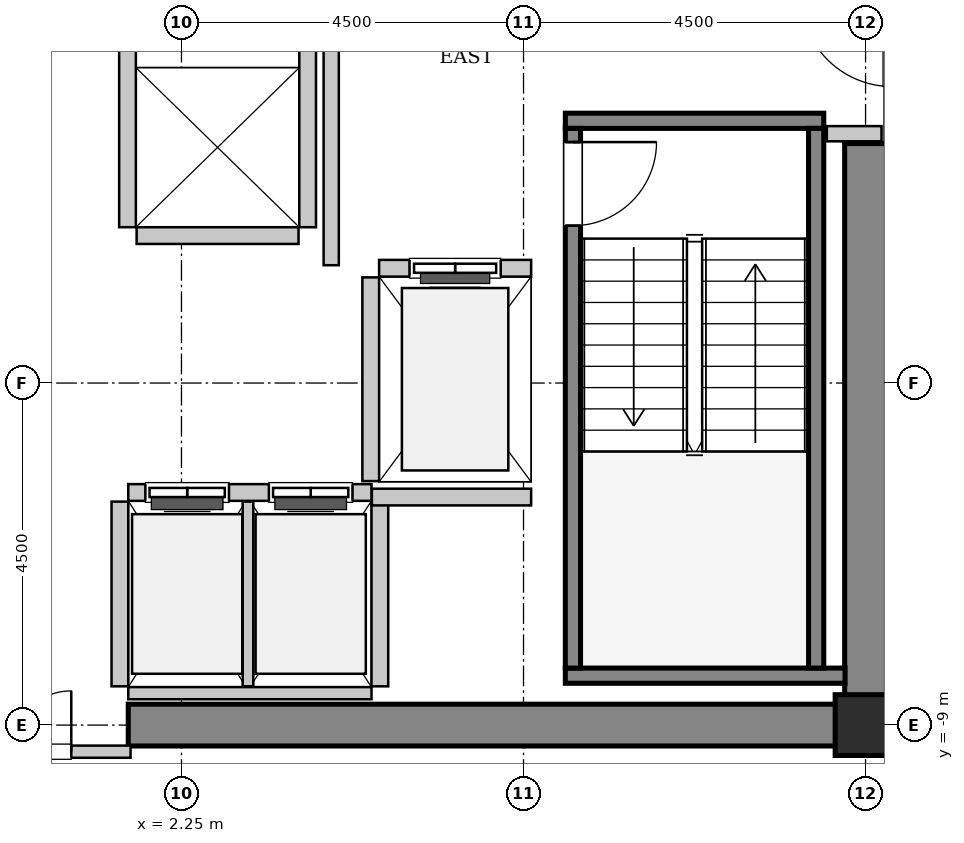
"""IFC4 building model, lengths in metres.
Left out: names, types, materials, properties, quantities, classifications, styles, units other than length and angle.
Written with IfcOpenShell. Run it as: python <this file> out.ifc"""

import sys

from ifc_helpers import new_model, si_unit, direction, frame, frame_2d, origin, origin_2d, place, context, subcontext, project, spatial, rectangle, hollow_rectangle, extrude, source, transform, mapped, element, fill, save


model = new_model("IFC4")
c1 = context("Model", 3, precision=1e-05, world=origin(), true_north=direction((0.0, 1.0)))
c2 = subcontext(c1, "Body", "Model", "MODEL_VIEW")
j1 = project(units=[si_unit("LENGTHUNIT", "METRE"), si_unit("PLANEANGLEUNIT", "RADIAN")], contexts=[c1])
p1 = place(None, origin())
s1 = spatial("IfcSite", under=j1, at=p1, CompositionType="ELEMENT")
p2 = place(p1, origin())
s2 = spatial("IfcBuilding", under=s1, at=p2, CompositionType="ELEMENT")
p3 = place(p2, frame((0.0, 0.0, 194.4)))
s3 = spatial("IfcBuildingStorey", under=s2, at=p3, CompositionType="ELEMENT", Elevation=194.4)
m1 = source(origin(), c2, "Body", "SweptSolid", [
    extrude(rectangle(XDim=9.975, YDim=0.55, at=frame_2d((4.987, 0.0))), origin(), (0.0, 0.0, 1.0), 3.8),
])
p4 = place(p3, frame((1.55, -9.0, 0.0), z_axis=(0.0, 0.0, 1.0), x_axis=(1.0, 0.0, 0.0)))
e1 = element("IfcWall", 1, at=p4, inside=s3, PredefinedType="SHEAR", context=c2, shape_type="MappedRepresentation", body=[
    mapped(m1, transform((0.0, 0.0, 0.0), x_axis=(1.0, 0.0, 0.0), y_axis=(0.0, 1.0, 0.0), z_axis=(0.0, 0.0, 1.0), scale=1.0)),
])
m2 = source(origin(), c2, "Body", "SweptSolid", [
    extrude(rectangle(XDim=7.375, YDim=0.55, at=frame_2d((3.688, 0.0))), origin(), (0.0, 0.0, 1.0), 3.8),
])
p5 = place(p3, frame((11.25, -8.725, 0.0), z_axis=(0.0, 0.0, 1.0), x_axis=(0.0, 1.0, 0.0)))
e2 = element("IfcWall", 2, at=p5, inside=s3, PredefinedType="SHEAR", context=c2, shape_type="MappedRepresentation", body=[
    mapped(m2, transform((0.0, 0.0, 0.0), x_axis=(1.0, 0.0, 0.0), y_axis=(0.0, 1.0, 0.0), z_axis=(0.0, 0.0, 1.0), scale=1.0)),
])
m3 = source(origin(), c2, "Body", "SweptSolid", [
    extrude(hollow_rectangle(XDim=0.8, YDim=0.8, WallThickness=0.04, InnerFilletRadius=0.04, OuterFilletRadius=0.08, at=origin_2d()), origin(), (0.0, 0.0, 1.0), 3.8),
])
p6 = place(p3, frame((11.25, -9.0, 0.0), z_axis=(0.0, 0.0, 1.0), x_axis=(1.0, 0.0, 0.0)))
e3 = element("IfcColumn", 3, at=p6, inside=s3, PredefinedType="COLUMN", context=c2, shape_type="MappedRepresentation", body=[
    mapped(m3, transform((0.0, 0.0, 0.0), x_axis=(1.0, 0.0, 0.0), y_axis=(0.0, 1.0, 0.0), z_axis=(0.0, 0.0, 1.0), scale=1.0)),
])
m4 = source(origin(), c2, "Body", "SweptSolid", [
    extrude(rectangle(XDim=3.4, YDim=0.2, at=frame_2d((1.7, 0.0))), origin(), (0.0, 0.0, 1.0), 3.8),
])
p7 = place(p3, frame((7.3, -1.05, 0.0), z_axis=(0.0, 0.0, 1.0), x_axis=(1.0, 0.0, 0.0)))
e4 = element("IfcWall", 4, at=p7, inside=s3, PredefinedType="SOLIDWALL", context=c2, shape_type="MappedRepresentation", body=[
    mapped(m4, transform((0.0, 0.0, 0.0), x_axis=(1.0, 0.0, 0.0), y_axis=(0.0, 1.0, 0.0), z_axis=(0.0, 0.0, 1.0), scale=1.0)),
])
m5 = source(origin(), c2, "Body", "SweptSolid", [
    extrude(rectangle(XDim=3.68, YDim=0.2, at=frame_2d((1.84, 0.0))), origin(), (0.0, 0.0, 1.0), 3.8),
])
p8 = place(p3, frame((7.3, -8.35, 0.0), z_axis=(0.0, 0.0, 1.0), x_axis=(1.0, 0.0, 0.0)))
e5 = element("IfcWall", 5, at=p8, inside=s3, PredefinedType="SOLIDWALL", context=c2, shape_type="MappedRepresentation", body=[
    mapped(m5, transform((0.0, 0.0, 0.0), x_axis=(1.0, 0.0, 0.0), y_axis=(0.0, 1.0, 0.0), z_axis=(0.0, 0.0, 1.0), scale=1.0)),
])
m6 = source(origin(), c2, "Body", "SweptSolid", [
    extrude(rectangle(XDim=7.1, YDim=0.2, at=frame_2d((3.55, 0.0))), origin(), (0.0, 0.0, 1.0), 3.8),
])
p9 = place(p3, frame((7.4, -1.15, 0.0), z_axis=(0.0, 0.0, 1.0), x_axis=(0.0, -1.0, 0.0)))
e6 = element("IfcWall", 6, at=p9, inside=s3, PredefinedType="SOLIDWALL", context=c2, shape_type="MappedRepresentation", body=[
    mapped(m6, transform((0.0, 0.0, 0.0), x_axis=(1.0, 0.0, 0.0), y_axis=(0.0, 1.0, 0.0), z_axis=(0.0, 0.0, 1.0), scale=1.0)),
])
p10 = place(p9, frame((0.18, 0.0, 0.0)))
e7 = element("IfcOpeningElement", 7, at=p10, cuts=e6, PredefinedType="OPENING", context=c2, shape_type="SweptSolid", body=[
    extrude(rectangle(XDim=1.1, YDim=2.15, at=frame_2d((0.55, 1.075))), frame((0.0, 0.11, 0.0), z_axis=(0.0, -1.0, 0.0), x_axis=(1.0, 0.0, 0.0)), (0.0, 0.0, 1.0), 0.22),
])
p11 = place(p3, frame((10.6, -1.15, 0.0), z_axis=(0.0, 0.0, 1.0), x_axis=(0.0, -1.0, 0.0)))
e8 = element("IfcWall", 8, at=p11, inside=s3, PredefinedType="SOLIDWALL", context=c2, shape_type="MappedRepresentation", body=[
    mapped(m6, transform((0.0, 0.0, 0.0), x_axis=(1.0, 0.0, 0.0), y_axis=(0.0, 1.0, 0.0), z_axis=(0.0, 0.0, 1.0), scale=1.0)),
])
m7 = source(origin(), c2, "Body", "SweptSolid", [
    extrude(rectangle(XDim=2.0, YDim=0.22, at=frame_2d((1.0, 0.0))), origin(), (0.0, 0.0, 1.0), 3.535),
])
p12 = place(p3, frame((6.85, -2.99, 0.0), z_axis=(0.0, 0.0, 1.0), x_axis=(-1.0, 0.0, 0.0)))
e9 = element("IfcWall", 9, at=p12, inside=s3, PredefinedType="SOLIDWALL", context=c2, shape_type="MappedRepresentation", body=[
    mapped(m7, transform((0.0, 0.0, 0.0), x_axis=(1.0, 0.0, 0.0), y_axis=(0.0, 1.0, 0.0), z_axis=(0.0, 0.0, 1.0), scale=1.0)),
])
p13 = place(p12, frame((0.4, 0.0, 0.0)))
e10 = element("IfcOpeningElement", 10, at=p13, cuts=e9, PredefinedType="OPENING", context=c2, shape_type="SweptSolid", body=[
    extrude(rectangle(XDim=1.2, YDim=2.2, at=frame_2d((0.6, 1.1))), frame((0.0, 0.12, 0.0), z_axis=(0.0, -1.0, 0.0), x_axis=(1.0, 0.0, 0.0)), (0.0, 0.0, 1.0), 0.24),
])
m8 = source(origin(), c2, "Body", "SweptSolid", [
    extrude(rectangle(XDim=2.68, YDim=0.22, at=frame_2d((1.34, 0.0))), origin(), (0.0, 0.0, 1.0), 3.535),
])
p14 = place(p3, frame((4.74, -3.11, 0.0), z_axis=(0.0, 0.0, 1.0), x_axis=(0.0, -1.0, 0.0)))
e11 = element("IfcWall", 11, at=p14, inside=s3, PredefinedType="SOLIDWALL", context=c2, shape_type="MappedRepresentation", body=[
    mapped(m8, transform((0.0, 0.0, 0.0), x_axis=(1.0, 0.0, 0.0), y_axis=(0.0, 1.0, 0.0), z_axis=(0.0, 0.0, 1.0), scale=1.0)),
])
m9 = source(origin(), c2, "Body", "SweptSolid", [
    extrude(rectangle(XDim=3.2, YDim=0.22, at=frame_2d((1.6, 0.0))), origin(), (0.0, 0.0, 1.0), 3.535),
])
p15 = place(p3, frame((4.75, -5.94, 0.0), z_axis=(0.0, 0.0, 1.0), x_axis=(-1.0, 0.0, 0.0)))
e12 = element("IfcWall", 12, at=p15, inside=s3, PredefinedType="SOLIDWALL", context=c2, shape_type="MappedRepresentation", body=[
    mapped(m9, transform((0.0, 0.0, 0.0), x_axis=(1.0, 0.0, 0.0), y_axis=(0.0, 1.0, 0.0), z_axis=(0.0, 0.0, 1.0), scale=1.0)),
])
p16 = place(p15, frame((1.875, 0.0, 0.0)))
e13 = element("IfcOpeningElement", 13, at=p16, cuts=e12, PredefinedType="OPENING", context=c2, shape_type="SweptSolid", body=[
    extrude(rectangle(XDim=1.1, YDim=2.2, at=frame_2d((0.55, 1.1))), frame((0.0, 0.12, 0.0), z_axis=(0.0, -1.0, 0.0), x_axis=(1.0, 0.0, 0.0)), (0.0, 0.0, 1.0), 0.24),
])
p17 = place(p15, frame((0.25, 0.0, 0.0)))
e14 = element("IfcOpeningElement", 14, at=p17, cuts=e12, PredefinedType="OPENING", context=c2, shape_type="SweptSolid", body=[
    extrude(rectangle(XDim=1.1, YDim=2.2, at=frame_2d((0.55, 1.1))), frame((0.0, 0.12, 0.0), z_axis=(0.0, -1.0, 0.0), x_axis=(1.0, 0.0, 0.0)), (0.0, 0.0, 1.0), 0.24),
])
m10 = source(origin(), c2, "Body", "SweptSolid", [
    extrude(rectangle(XDim=3.2, YDim=0.16, at=frame_2d((1.6, 0.0))), origin(), (0.0, 0.0, 1.0), 2.425),
])
p18 = place(p3, frame((1.55, -8.58, 0.0), z_axis=(0.0, 0.0, 1.0), x_axis=(1.0, 0.0, 0.0)))
e15 = element("IfcWall", 15, at=p18, inside=s3, PredefinedType="PARTITIONING", context=c2, shape_type="MappedRepresentation", body=[
    mapped(m10, transform((0.0, 0.0, 0.0), x_axis=(1.0, 0.0, 0.0), y_axis=(0.0, 1.0, 0.0), z_axis=(0.0, 0.0, 1.0), scale=1.0)),
])
m11 = source(origin(), c2, "Body", "SweptSolid", [
    extrude(rectangle(XDim=2.43, YDim=0.22, at=frame_2d((1.215, 0.0))), origin(), (0.0, 0.0, 1.0), 3.535),
])
p19 = place(p3, frame((1.44, -6.06, 0.0), z_axis=(0.0, 0.0, 1.0), x_axis=(0.0, -1.0, 0.0)))
e16 = element("IfcWall", 16, at=p19, inside=s3, PredefinedType="SOLIDWALL", context=c2, shape_type="MappedRepresentation", body=[
    mapped(m11, transform((0.0, 0.0, 0.0), x_axis=(1.0, 0.0, 0.0), y_axis=(0.0, 1.0, 0.0), z_axis=(0.0, 0.0, 1.0), scale=1.0)),
])
m12 = source(origin(), c2, "Body", "SweptSolid", [
    extrude(rectangle(XDim=2.43, YDim=0.14, at=frame_2d((1.215, 0.0))), origin(), (0.0, 0.0, 1.0), 3.535),
])
p20 = place(p3, frame((3.125, -8.49, 0.0), z_axis=(0.0, 0.0, 1.0), x_axis=(0.0, 1.0, 0.0)))
e17 = element("IfcWall", 17, at=p20, inside=s3, PredefinedType="PARTITIONING", context=c2, shape_type="MappedRepresentation", body=[
    mapped(m12, transform((0.0, 0.0, 0.0), x_axis=(1.0, 0.0, 0.0), y_axis=(0.0, 1.0, 0.0), z_axis=(0.0, 0.0, 1.0), scale=1.0)),
])
p21 = place(p3, frame((4.86, -8.49, 0.0), z_axis=(0.0, 0.0, 1.0), x_axis=(0.0, 1.0, 0.0)))
e18 = element("IfcWall", 18, at=p21, inside=s3, PredefinedType="SOLIDWALL", context=c2, shape_type="MappedRepresentation", body=[
    mapped(m11, transform((0.0, 0.0, 0.0), x_axis=(1.0, 0.0, 0.0), y_axis=(0.0, 1.0, 0.0), z_axis=(0.0, 0.0, 1.0), scale=1.0)),
])
m13 = source(origin(), c2, "Body", "SweptSolid", [
    extrude(rectangle(XDim=4.9, YDim=0.22, at=frame_2d((2.45, 0.0))), origin(), (0.0, 0.0, 1.0), 3.535),
])
for number, where, z_axis, x_axis in (
    (19, (1.54, 2.45, 0.0), (0.0, 0.0, 1.0), (0.0, -1.0, 0.0)),
    (20, (3.91, -2.45, 0.0), (0.0, 0.0, 1.0), (0.0, 1.0, 0.0)),
):
    element("IfcWall", number, at=place(p3, frame(where, z_axis=z_axis, x_axis=x_axis)), inside=s3, PredefinedType="SOLIDWALL", context=c2, shape_type="MappedRepresentation", body=[
        mapped(m13, transform((0.0, 0.0, 0.0), x_axis=(1.0, 0.0, 0.0), y_axis=(0.0, 1.0, 0.0), z_axis=(0.0, 0.0, 1.0), scale=1.0)),
    ])
m14 = source(origin(), c2, "Body", "SweptSolid", [
    extrude(rectangle(XDim=2.13, YDim=0.22, at=frame_2d((1.065, 0.0))), origin(), (0.0, 0.0, 1.0), 3.535),
])
p22 = place(p3, frame((1.66, -2.56, 0.0), z_axis=(0.0, 0.0, 1.0), x_axis=(1.0, 0.0, 0.0)))
e21 = element("IfcWall", 21, at=p22, inside=s3, PredefinedType="SOLIDWALL", context=c2, shape_type="MappedRepresentation", body=[
    mapped(m14, transform((0.0, 0.0, 0.0), x_axis=(1.0, 0.0, 0.0), y_axis=(0.0, 1.0, 0.0), z_axis=(0.0, 0.0, 1.0), scale=1.0)),
])
m15 = source(origin(), c2, "Body", "SweptSolid", [
    extrude(rectangle(XDim=2.095, YDim=0.22, at=frame_2d((1.048, 0.0))), origin(), (0.0, 0.0, 1.0), 3.535),
])
p23 = place(p3, frame((4.755, -6.0, 0.0), z_axis=(0.0, 0.0, 1.0), x_axis=(1.0, 0.0, 0.0)))
e22 = element("IfcWall", 22, at=p23, inside=s3, PredefinedType="SOLIDWALL", context=c2, shape_type="MappedRepresentation", body=[
    mapped(m15, transform((0.0, 0.0, 0.0), x_axis=(1.0, 0.0, 0.0), y_axis=(0.0, 1.0, 0.0), z_axis=(0.0, 0.0, 1.0), scale=1.0)),
])
m16 = source(origin(), c2, "Body", "SweptSolid", [
    extrude(rectangle(XDim=5.9, YDim=0.2, at=frame_2d((2.95, 0.0))), origin(), (0.0, 0.0, 1.0), 3.535),
])
p24 = place(p3, frame((4.22, -2.95, 0.0), z_axis=(0.0, 0.0, 1.0), x_axis=(0.0, 1.0, 0.0)))
e23 = element("IfcWall", 23, at=p24, inside=s3, PredefinedType="PARTITIONING", context=c2, shape_type="MappedRepresentation", body=[
    mapped(m16, transform((0.0, 0.0, 0.0), x_axis=(1.0, 0.0, 0.0), y_axis=(0.0, 1.0, 0.0), z_axis=(0.0, 0.0, 1.0), scale=1.0)),
])
m17 = source(origin(), c2, "Body", "SweptSolid", [
    extrude(rectangle(XDim=0.72, YDim=0.2, at=frame_2d((0.36, 0.0))), origin(), (0.0, 0.0, 1.0), 3.535),
])
p25 = place(p3, frame((10.74, -1.22, 0.0), z_axis=(0.0, 0.0, 1.0), x_axis=(1.0, 0.0, 0.0)))
e24 = element("IfcWall", 24, at=p25, inside=s3, PredefinedType="PARTITIONING", context=c2, shape_type="MappedRepresentation", body=[
    mapped(m17, transform((0.0, 0.0, 0.0), x_axis=(1.0, 0.0, 0.0), y_axis=(0.0, 1.0, 0.0), z_axis=(0.0, 0.0, 1.0), scale=1.0)),
])
m18 = source(origin(), c2, "Body", "SweptSolid", [
    extrude(rectangle(XDim=3.16, YDim=0.16, at=frame_2d((1.58, 0.0))), origin(), (0.0, 0.0, 1.0), 2.425),
])
p26 = place(p3, frame((-1.58, -9.35, 0.0), z_axis=(0.0, 0.0, 1.0), x_axis=(1.0, 0.0, 0.0)))
e25 = element("IfcWall", 25, at=p26, inside=s3, PredefinedType="PARTITIONING", context=c2, shape_type="MappedRepresentation", body=[
    mapped(m18, transform((0.0, 0.0, 0.0), x_axis=(1.0, 0.0, 0.0), y_axis=(0.0, 1.0, 0.0), z_axis=(0.0, 0.0, 1.0), scale=1.0)),
])
p27 = place(p26, frame((0.78, 0.0, 0.0)))
e26 = element("IfcOpeningElement", 26, at=p27, cuts=e25, PredefinedType="OPENING", context=c2, shape_type="SweptSolid", body=[
    extrude(rectangle(XDim=1.6, YDim=2.3, at=frame_2d((0.8, 1.15))), frame((0.0, 0.09, 0.0), z_axis=(0.0, -1.0, 0.0), x_axis=(1.0, 0.0, 0.0)), (0.0, 0.0, 1.0), 0.18),
])
m19 = source(origin(), c2, "Body", "SweptSolid", [
    extrude(rectangle(XDim=1.1, YDim=2.15, at=frame_2d((0.55, 1.075))), frame((0.0, 0.025, 0.0), z_axis=(0.0, -1.0, 0.0), x_axis=(1.0, 0.0, 0.0)), (0.0, 0.0, 1.0), 0.05),
])
p28 = place(p10, origin())
e27 = element("IfcDoor", 27, at=p28, inside=s3, OperationType="SINGLE_SWING_LEFT", PredefinedType="DOOR", context=c2, shape_type="MappedRepresentation", body=[
    mapped(m19, transform((0.0, 0.0, 0.0), x_axis=(1.0, 0.0, 0.0), y_axis=(0.0, 1.0, 0.0), z_axis=(0.0, 0.0, 1.0), scale=1.0)),
])
fill(e7, e27)
m20 = source(origin(), c2, "Body", "SweptSolid", [
    extrude(rectangle(XDim=1.2, YDim=2.2, at=frame_2d((0.6, 1.1))), frame((0.0, 0.025, 0.0), z_axis=(0.0, -1.0, 0.0), x_axis=(1.0, 0.0, 0.0)), (0.0, 0.0, 1.0), 0.05),
])
p29 = place(p13, origin())
e28 = element("IfcDoor", 28, at=p29, inside=s3, OperationType="SLIDING_TO_LEFT", PredefinedType="DOOR", context=c2, shape_type="MappedRepresentation", body=[
    mapped(m20, transform((0.0, 0.0, 0.0), x_axis=(1.0, 0.0, 0.0), y_axis=(0.0, 1.0, 0.0), z_axis=(0.0, 0.0, 1.0), scale=1.0)),
])
fill(e10, e28)
m21 = source(origin(), c2, "Body", "SweptSolid", [
    extrude(rectangle(XDim=1.1, YDim=2.2, at=frame_2d((0.55, 1.1))), frame((0.0, 0.025, 0.0), z_axis=(0.0, -1.0, 0.0), x_axis=(1.0, 0.0, 0.0)), (0.0, 0.0, 1.0), 0.05),
])
p30 = place(p16, origin())
e29 = element("IfcDoor", 29, at=p30, inside=s3, OperationType="DOUBLE_DOOR_SLIDING", PredefinedType="DOOR", context=c2, shape_type="MappedRepresentation", body=[
    mapped(m21, transform((0.0, 0.0, 0.0), x_axis=(1.0, 0.0, 0.0), y_axis=(0.0, 1.0, 0.0), z_axis=(0.0, 0.0, 1.0), scale=1.0)),
])
fill(e13, e29)
p31 = place(p17, origin())
e30 = element("IfcDoor", 30, at=p31, inside=s3, OperationType="DOUBLE_DOOR_SLIDING", PredefinedType="DOOR", context=c2, shape_type="MappedRepresentation", body=[
    mapped(m21, transform((0.0, 0.0, 0.0), x_axis=(1.0, 0.0, 0.0), y_axis=(0.0, 1.0, 0.0), z_axis=(0.0, 0.0, 1.0), scale=1.0)),
])
fill(e14, e30)
m22 = source(origin(), c2, "Body", "SweptSolid", [
    extrude(rectangle(XDim=1.6, YDim=2.3, at=frame_2d((0.8, 1.15))), frame((0.0, 0.025, 0.0), z_axis=(0.0, -1.0, 0.0), x_axis=(1.0, 0.0, 0.0)), (0.0, 0.0, 1.0), 0.05),
])
p32 = place(p27, origin())
e31 = element("IfcDoor", 31, at=p32, inside=s3, OperationType="DOUBLE_DOOR_SINGLE_SWING", PredefinedType="DOOR", context=c2, shape_type="MappedRepresentation", body=[
    mapped(m22, transform((0.0, 0.0, 0.0), x_axis=(1.0, 0.0, 0.0), y_axis=(0.0, 1.0, 0.0), z_axis=(0.0, 0.0, 1.0), scale=1.0)),
])
fill(e26, e31)
save(model, sys.argv[1])
